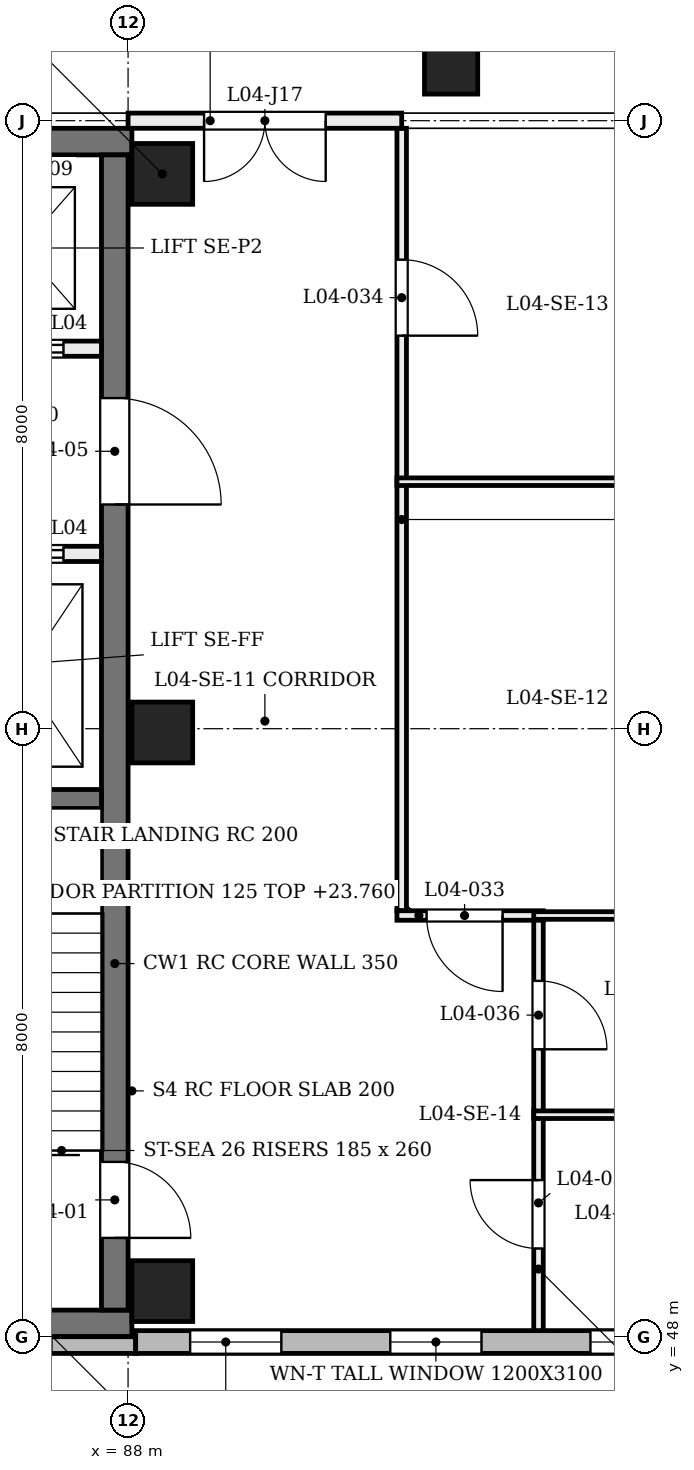
"""IFC4 building model, lengths in metres.
Left out: names, types, materials, properties, quantities, classifications, styles, units other than length and angle.
Written with IfcOpenShell. Run it as: python <this file> out.ifc"""

import sys

from ifc_helpers import new_model, si_unit, direction, frame, frame_2d, origin, origin_2d, place, context, subcontext, project, spatial, rectangle, extrude, element, fill, save


model = new_model("IFC4")
c1 = context("Model", 3, precision=1e-05, world=origin(), true_north=direction((0.0, 1.0)))
c2 = subcontext(c1, "Body", "Model", "MODEL_VIEW")
j1 = project(units=[si_unit("LENGTHUNIT", "METRE"), si_unit("PLANEANGLEUNIT", "RADIAN")], contexts=[c1])
p1 = place(None, origin())
s1 = spatial("IfcSite", under=j1, at=p1, CompositionType="ELEMENT")
p2 = place(p1, origin())
s2 = spatial("IfcBuilding", under=s1, at=p2, CompositionType="ELEMENT")
p3 = place(p2, frame((0.0, 0.0, 19.2)))
s3 = spatial("IfcBuildingStorey", under=s2, at=p3, CompositionType="ELEMENT", Elevation=19.2)
for number, where, z_axis, x_axis in (
    (1, (80.1, 48.175, 0.0), (0.0, 0.0, 1.0), (1.0, 0.0, 0.0)),
    (2, (80.1, 63.725, 0.0), (0.0, 0.0, 1.0), (1.0, 0.0, 0.0)),
):
    element("IfcWall", number, at=place(p3, frame(where, z_axis=z_axis, x_axis=x_axis)), inside=s3, PredefinedType="SHEAR", context=c2, shape_type="SweptSolid", body=[
        extrude(rectangle(XDim=7.95, YDim=0.35, at=frame_2d((3.975, 0.0))), origin(), (0.0, 0.0, 1.0), 4.58),
    ])
p4 = place(p3, frame((87.825, 48.35, 0.0), z_axis=(0.0, 0.0, 1.0), x_axis=(0.0, 1.0, 0.0)))
e3 = element("IfcWall", 3, at=p4, inside=s3, PredefinedType="SHEAR", context=c2, shape_type="SweptSolid", body=[
    extrude(rectangle(XDim=15.2, YDim=0.35, at=frame_2d((7.6, 0.0))), origin(), (0.0, 0.0, 1.0), 4.58),
])
p5 = place(p4, frame((0.95, 0.0, 0.0)))
e4 = element("IfcOpeningElement", 4, at=p5, cuts=e3, PredefinedType="OPENING", context=c2, shape_type="SweptSolid", body=[
    extrude(rectangle(XDim=1.0, YDim=2.1, at=frame_2d((0.5, 1.05))), frame((0.0, 0.185, 0.0), z_axis=(0.0, -1.0, 0.0), x_axis=(1.0, 0.0, 0.0)), (0.0, 0.0, 1.0), 0.37),
])
p6 = place(p4, frame((10.6, 0.0, 0.0)))
e5 = element("IfcOpeningElement", 5, at=p6, cuts=e3, PredefinedType="OPENING", context=c2, shape_type="SweptSolid", body=[
    extrude(rectangle(XDim=1.4, YDim=2.1, at=frame_2d((0.7, 1.05))), frame((0.0, 0.185, 0.0), z_axis=(0.0, -1.0, 0.0), x_axis=(1.0, 0.0, 0.0)), (0.0, 0.0, 1.0), 0.37),
])
for number, where, z_axis, x_axis in (
    (6, (88.45, 48.6, 0.0), (0.0, 0.0, 1.0), (1.0, 0.0, 0.0)),
    (7, (88.45, 55.95, 0.0), (0.0, 0.0, 1.0), (1.0, 0.0, 0.0)),
    (8, (88.45, 63.3, 0.0), (0.0, 0.0, 1.0), (1.0, 0.0, 0.0)),
):
    element("IfcColumn", number, at=place(p3, frame(where, z_axis=z_axis, x_axis=x_axis)), inside=s3, PredefinedType="COLUMN", context=c2, shape_type="SweptSolid", body=[
        extrude(rectangle(XDim=0.8, YDim=0.8, at=origin_2d()), origin(), (0.0, 0.0, 1.0), 4.8),
    ])
p7 = place(p3, frame((92.0, 64.7, 0.0), z_axis=(0.203937582782, 0.0, 0.978983892783), x_axis=(0.0, 1.0, 0.0)))
e9 = element("IfcColumn", 9, at=p7, inside=s3, PredefinedType="COLUMN", context=c2, shape_type="SweptSolid", body=[
    extrude(rectangle(XDim=0.7, YDim=0.7, at=origin_2d()), origin(), (0.0, 0.0, 1.0), 4.678),
])
p8 = place(p3, frame((79.9, 47.89, 0.0), z_axis=(0.0, 0.0, 1.0), x_axis=(1.0, 0.0, 0.0)))
e10 = element("IfcWall", 10, at=p8, inside=s3, PredefinedType="SOLIDWALL", context=c2, shape_type="SweptSolid", body=[
    extrude(rectangle(XDim=8.2, YDim=0.22, at=frame_2d((4.1, 0.0))), origin(), (0.0, 0.0, 1.0), 3.9),
])
p9 = place(p8, frame((1.308, 0.0, 0.9)))
e11 = element("IfcOpeningElement", 11, at=p9, cuts=e10, PredefinedType="OPENING", context=c2, shape_type="SweptSolid", body=[
    extrude(rectangle(XDim=0.45, YDim=2.6, at=frame_2d((0.225, 1.3))), frame((0.0, 0.12, 0.0), z_axis=(0.0, -1.0, 0.0), x_axis=(1.0, 0.0, 0.0)), (0.0, 0.0, 1.0), 0.24),
])
p10 = place(p8, frame((3.975, 0.0, 0.9)))
e12 = element("IfcOpeningElement", 12, at=p10, cuts=e10, PredefinedType="OPENING", context=c2, shape_type="SweptSolid", body=[
    extrude(rectangle(XDim=0.45, YDim=2.6, at=frame_2d((0.225, 1.3))), frame((0.0, 0.12, 0.0), z_axis=(0.0, -1.0, 0.0), x_axis=(1.0, 0.0, 0.0)), (0.0, 0.0, 1.0), 0.24),
])
p11 = place(p8, frame((6.642, 0.0, 0.9)))
e13 = element("IfcOpeningElement", 13, at=p11, cuts=e10, PredefinedType="OPENING", context=c2, shape_type="SweptSolid", body=[
    extrude(rectangle(XDim=0.45, YDim=2.6, at=frame_2d((0.225, 1.3))), frame((0.0, 0.12, 0.0), z_axis=(0.0, -1.0, 0.0), x_axis=(1.0, 0.0, 0.0)), (0.0, 0.0, 1.0), 0.24),
])
p12 = place(p3, frame((88.1, 47.93, 0.0), z_axis=(0.0, 0.0, 1.0), x_axis=(1.0, 0.0, 0.0)))
e14 = element("IfcWall", 14, at=p12, inside=s3, PredefinedType="SOLIDWALL", context=c2, shape_type="SweptSolid", body=[
    extrude(rectangle(XDim=7.9, YDim=0.3, at=frame_2d((3.95, 0.0))), origin(), (0.0, 0.0, 1.0), 3.9),
])
p13 = place(p12, frame((0.717, 0.0, 0.75)))
e15 = element("IfcOpeningElement", 15, at=p13, cuts=e14, PredefinedType="OPENING", context=c2, shape_type="SweptSolid", body=[
    extrude(rectangle(XDim=1.2, YDim=3.1, at=frame_2d((0.6, 1.55))), frame((0.0, 0.16, 0.0), z_axis=(0.0, -1.0, 0.0), x_axis=(1.0, 0.0, 0.0)), (0.0, 0.0, 1.0), 0.32),
])
p14 = place(p12, frame((3.35, 0.0, 0.75)))
e16 = element("IfcOpeningElement", 16, at=p14, cuts=e14, PredefinedType="OPENING", context=c2, shape_type="SweptSolid", body=[
    extrude(rectangle(XDim=1.2, YDim=3.1, at=frame_2d((0.6, 1.55))), frame((0.0, 0.16, 0.0), z_axis=(0.0, -1.0, 0.0), x_axis=(1.0, 0.0, 0.0)), (0.0, 0.0, 1.0), 0.32),
])
p15 = place(p12, frame((5.983, 0.0, 0.75)))
e17 = element("IfcOpeningElement", 17, at=p15, cuts=e14, PredefinedType="OPENING", context=c2, shape_type="SweptSolid", body=[
    extrude(rectangle(XDim=1.2, YDim=3.1, at=frame_2d((0.6, 1.55))), frame((0.0, 0.16, 0.0), z_axis=(0.0, -1.0, 0.0), x_axis=(1.0, 0.0, 0.0)), (0.0, 0.0, 1.0), 0.32),
])
p16 = place(p3, frame((87.65, 55.075, 0.0), z_axis=(0.0, 0.0, 1.0), x_axis=(-1.0, 0.0, 0.0)))
e18 = element("IfcWall", 18, at=p16, inside=s3, PredefinedType="SOLIDWALL", context=c2, shape_type="SweptSolid", body=[
    extrude(rectangle(XDim=3.1, YDim=0.25, at=frame_2d((1.55, 0.0))), origin(), (0.0, 0.0, 1.0), 4.55),
])
p17 = place(p3, frame((87.65, 58.3, 0.0), z_axis=(0.0, 0.0, 1.0), x_axis=(-1.0, 0.0, 0.0)))
e19 = element("IfcWall", 19, at=p17, inside=s3, PredefinedType="SOLIDWALL", context=c2, shape_type="SweptSolid", body=[
    extrude(rectangle(XDim=7.2, YDim=0.2, at=frame_2d((3.6, 0.0))), origin(), (0.0, 0.0, 1.0), 4.55),
])
p18 = place(p17, frame((0.5, 0.0, 0.0)))
e20 = element("IfcOpeningElement", 20, at=p18, cuts=e19, PredefinedType="OPENING", context=c2, shape_type="SweptSolid", body=[
    extrude(rectangle(XDim=1.1, YDim=2.1, at=frame_2d((0.55, 1.05))), frame((0.0, 0.11, 0.0), z_axis=(0.0, -1.0, 0.0), x_axis=(1.0, 0.0, 0.0)), (0.0, 0.0, 1.0), 0.22),
])
p19 = place(p17, frame((5.6, 0.0, 0.0)))
e21 = element("IfcOpeningElement", 21, at=p19, cuts=e19, PredefinedType="OPENING", context=c2, shape_type="SweptSolid", body=[
    extrude(rectangle(XDim=1.1, YDim=2.1, at=frame_2d((0.55, 1.05))), frame((0.0, 0.11, 0.0), z_axis=(0.0, -1.0, 0.0), x_axis=(1.0, 0.0, 0.0)), (0.0, 0.0, 1.0), 0.22),
])
p20 = place(p17, frame((3.1, 0.0, 0.0)))
e22 = element("IfcOpeningElement", 22, at=p20, cuts=e19, PredefinedType="OPENING", context=c2, shape_type="SweptSolid", body=[
    extrude(rectangle(XDim=1.0, YDim=2.1, at=frame_2d((0.5, 1.05))), frame((0.0, 0.11, 0.0), z_axis=(0.0, -1.0, 0.0), x_axis=(1.0, 0.0, 0.0)), (0.0, 0.0, 1.0), 0.22),
])
p21 = place(p3, frame((87.65, 61.0, 0.0), z_axis=(0.0, 0.0, 1.0), x_axis=(-1.0, 0.0, 0.0)))
e23 = element("IfcWall", 23, at=p21, inside=s3, PredefinedType="SOLIDWALL", context=c2, shape_type="SweptSolid", body=[
    extrude(rectangle(XDim=7.2, YDim=0.2, at=frame_2d((3.6, 0.0))), origin(), (0.0, 0.0, 1.0), 4.55),
])
p22 = place(p21, frame((0.5, 0.0, 0.0)))
e24 = element("IfcOpeningElement", 24, at=p22, cuts=e23, PredefinedType="OPENING", context=c2, shape_type="SweptSolid", body=[
    extrude(rectangle(XDim=1.1, YDim=2.1, at=frame_2d((0.55, 1.05))), frame((0.0, 0.11, 0.0), z_axis=(0.0, -1.0, 0.0), x_axis=(1.0, 0.0, 0.0)), (0.0, 0.0, 1.0), 0.22),
])
p23 = place(p21, frame((5.6, 0.0, 0.0)))
e25 = element("IfcOpeningElement", 25, at=p23, cuts=e23, PredefinedType="OPENING", context=c2, shape_type="SweptSolid", body=[
    extrude(rectangle(XDim=1.1, YDim=2.1, at=frame_2d((0.55, 1.05))), frame((0.0, 0.11, 0.0), z_axis=(0.0, -1.0, 0.0), x_axis=(1.0, 0.0, 0.0)), (0.0, 0.0, 1.0), 0.22),
])
p24 = place(p21, frame((3.1, 0.0, 0.0)))
e26 = element("IfcOpeningElement", 26, at=p24, cuts=e23, PredefinedType="OPENING", context=c2, shape_type="SweptSolid", body=[
    extrude(rectangle(XDim=1.0, YDim=2.1, at=frame_2d((0.5, 1.05))), frame((0.0, 0.11, 0.0), z_axis=(0.0, -1.0, 0.0), x_axis=(1.0, 0.0, 0.0)), (0.0, 0.0, 1.0), 0.22),
])
p25 = place(p3, frame((91.6, 53.605, 0.0), z_axis=(0.0, 0.0, 1.0), x_axis=(0.0, 1.0, 0.0)))
e27 = element("IfcWall", 27, at=p25, inside=s3, PredefinedType="PARTITIONING", context=c2, shape_type="SweptSolid", body=[
    extrude(rectangle(XDim=10.295, YDim=0.125, at=frame_2d((5.147, 0.0))), origin(), (0.0, 0.0, 1.0), 3.88),
])
p26 = place(p25, frame((7.567, 0.0, 0.0)))
e28 = element("IfcOpeningElement", 28, at=p26, cuts=e27, PredefinedType="OPENING", context=c2, shape_type="SweptSolid", body=[
    extrude(rectangle(XDim=1.0, YDim=2.1, at=frame_2d((0.5, 1.05))), frame((0.0, 0.073, 0.0), z_axis=(0.0, -1.0, 0.0), x_axis=(1.0, 0.0, 0.0)), (0.0, 0.0, 1.0), 0.145),
])
p27 = place(p3, frame((91.538, 53.542, 0.0), z_axis=(0.0, 0.0, 1.0), x_axis=(1.0, 0.0, 0.0)))
e29 = element("IfcWall", 29, at=p27, inside=s3, PredefinedType="PARTITIONING", context=c2, shape_type="SweptSolid", body=[
    extrude(rectangle(XDim=1.925, YDim=0.125, at=frame_2d((0.962, 0.0))), origin(), (0.0, 0.0, 1.0), 4.56),
])
p28 = place(p27, frame((0.39, 0.0, 0.0)))
e30 = element("IfcOpeningElement", 30, at=p28, cuts=e29, PredefinedType="OPENING", context=c2, shape_type="SweptSolid", body=[
    extrude(rectangle(XDim=1.0, YDim=2.1, at=frame_2d((0.5, 1.05))), frame((0.0, 0.073, 0.0), z_axis=(0.0, -1.0, 0.0), x_axis=(1.0, 0.0, 0.0)), (0.0, 0.0, 1.0), 0.145),
])
p29 = place(p3, frame((93.337, 53.542, 0.0), z_axis=(0.0, 0.0, 1.0), x_axis=(1.0, 0.0, 0.0)))
e31 = element("IfcWall", 31, at=p29, inside=s3, PredefinedType="PARTITIONING", context=c2, shape_type="SweptSolid", body=[
    extrude(rectangle(XDim=2.583, YDim=0.1, at=frame_2d((1.291, 0.0))), origin(), (0.0, 0.0, 1.0), 3.88),
])
p30 = place(p3, frame((91.538, 59.25, 0.0), z_axis=(0.0, 0.0, 1.0), x_axis=(1.0, 0.0, 0.0)))
e32 = element("IfcWall", 32, at=p30, inside=s3, PredefinedType="PARTITIONING", context=c2, shape_type="SweptSolid", body=[
    extrude(rectangle(XDim=4.162, YDim=0.1, at=frame_2d((2.081, 0.0))), origin(), (0.0, 0.0, 1.0), 3.98),
])
p31 = place(p3, frame((93.4, 48.08, 0.0), z_axis=(0.0, 0.0, 1.0), x_axis=(0.0, 1.0, 0.0)))
e33 = element("IfcWall", 33, at=p31, inside=s3, PredefinedType="PARTITIONING", context=c2, shape_type="SweptSolid", body=[
    extrude(rectangle(XDim=5.4, YDim=0.125, at=frame_2d((2.7, 0.0))), origin(), (0.0, 0.0, 1.0), 3.88),
])
p32 = place(p31, frame((1.081, 0.0, 0.0)))
e34 = element("IfcOpeningElement", 34, at=p32, cuts=e33, PredefinedType="OPENING", context=c2, shape_type="SweptSolid", body=[
    extrude(rectangle(XDim=0.9, YDim=2.1, at=frame_2d((0.45, 1.05))), frame((0.0, 0.073, 0.0), z_axis=(0.0, -1.0, 0.0), x_axis=(1.0, 0.0, 0.0)), (0.0, 0.0, 1.0), 0.145),
])
p33 = place(p31, frame((3.702, 0.0, 0.0)))
e35 = element("IfcOpeningElement", 35, at=p33, cuts=e33, PredefinedType="OPENING", context=c2, shape_type="SweptSolid", body=[
    extrude(rectangle(XDim=0.9, YDim=2.1, at=frame_2d((0.45, 1.05))), frame((0.0, 0.073, 0.0), z_axis=(0.0, -1.0, 0.0), x_axis=(1.0, 0.0, 0.0)), (0.0, 0.0, 1.0), 0.145),
])
p34 = place(p3, frame((93.337, 50.921, 0.0), z_axis=(0.0, 0.0, 1.0), x_axis=(1.0, 0.0, 0.0)))
e36 = element("IfcWall", 36, at=p34, inside=s3, PredefinedType="PARTITIONING", context=c2, shape_type="SweptSolid", body=[
    extrude(rectangle(XDim=2.583, YDim=0.1, at=frame_2d((1.291, 0.0))), origin(), (0.0, 0.0, 1.0), 3.88),
])
p35 = place(p3, frame((88.0, 64.0, 0.0), z_axis=(0.0, 0.0, 1.0), x_axis=(1.0, 0.0, 0.0)))
e37 = element("IfcWall", 37, at=p35, inside=s3, PredefinedType="PARTITIONING", context=c2, shape_type="SweptSolid", body=[
    extrude(rectangle(XDim=3.6, YDim=0.2, at=frame_2d((1.8, 0.0))), origin(), (0.0, 0.0, 1.0), 3.88),
])
p36 = place(p35, frame((1.0, 0.0, 0.0)))
e38 = element("IfcOpeningElement", 38, at=p36, cuts=e37, PredefinedType="OPENING", context=c2, shape_type="SweptSolid", body=[
    extrude(rectangle(XDim=1.6, YDim=2.1, at=frame_2d((0.8, 1.05))), frame((0.0, 0.11, 0.0), z_axis=(0.0, -1.0, 0.0), x_axis=(1.0, 0.0, 0.0)), (0.0, 0.0, 1.0), 0.22),
])
p37 = place(p13, origin())
e39 = element("IfcWindow", 39, at=p37, inside=s3, PartitioningType="SINGLE_PANEL", PredefinedType="WINDOW", context=c2, shape_type="SweptSolid", body=[
    extrude(rectangle(XDim=1.2, YDim=3.1, at=frame_2d((0.6, 1.55))), frame((0.0, 0.03, 0.0), z_axis=(0.0, -1.0, 0.0), x_axis=(1.0, 0.0, 0.0)), (0.0, 0.0, 1.0), 0.06),
])
fill(e15, e39)
p38 = place(p14, origin())
e40 = element("IfcWindow", 40, at=p38, inside=s3, PartitioningType="SINGLE_PANEL", PredefinedType="WINDOW", context=c2, shape_type="SweptSolid", body=[
    extrude(rectangle(XDim=1.2, YDim=3.1, at=frame_2d((0.6, 1.55))), frame((0.0, 0.03, 0.0), z_axis=(0.0, -1.0, 0.0), x_axis=(1.0, 0.0, 0.0)), (0.0, 0.0, 1.0), 0.06),
])
fill(e16, e40)
p39 = place(p15, origin())
e41 = element("IfcWindow", 41, at=p39, inside=s3, PartitioningType="SINGLE_PANEL", PredefinedType="WINDOW", context=c2, shape_type="SweptSolid", body=[
    extrude(rectangle(XDim=1.2, YDim=3.1, at=frame_2d((0.6, 1.55))), frame((0.0, 0.03, 0.0), z_axis=(0.0, -1.0, 0.0), x_axis=(1.0, 0.0, 0.0)), (0.0, 0.0, 1.0), 0.06),
])
fill(e17, e41)
p40 = place(p5, frame((1.0, 0.0, 0.0), z_axis=(0.0, 0.0, 1.0), x_axis=(-1.0, 0.0, 0.0)))
e42 = element("IfcDoor", 42, at=p40, inside=s3, OperationType="SINGLE_SWING_LEFT", PredefinedType="DOOR", context=c2, shape_type="SweptSolid", body=[
    extrude(rectangle(XDim=1.0, YDim=2.1, at=frame_2d((0.5, 1.05))), frame((0.0, 0.025, 0.0), z_axis=(0.0, -1.0, 0.0), x_axis=(1.0, 0.0, 0.0)), (0.0, 0.0, 1.0), 0.05),
])
fill(e4, e42)
p41 = place(p18, frame((1.1, 0.0, 0.0), z_axis=(0.0, 0.0, 1.0), x_axis=(-1.0, 0.0, 0.0)))
e43 = element("IfcDoor", 43, at=p41, inside=s3, OperationType="DOUBLE_DOOR_SLIDING", PredefinedType="DOOR", context=c2, shape_type="SweptSolid", body=[
    extrude(rectangle(XDim=1.1, YDim=2.1, at=frame_2d((0.55, 1.05))), frame((0.0, 0.025, 0.0), z_axis=(0.0, -1.0, 0.0), x_axis=(1.0, 0.0, 0.0)), (0.0, 0.0, 1.0), 0.05),
])
fill(e20, e43)
p42 = place(p22, origin())
e44 = element("IfcDoor", 44, at=p42, inside=s3, OperationType="DOUBLE_DOOR_SLIDING", PredefinedType="DOOR", context=c2, shape_type="SweptSolid", body=[
    extrude(rectangle(XDim=1.1, YDim=2.1, at=frame_2d((0.55, 1.05))), frame((0.0, 0.025, 0.0), z_axis=(0.0, -1.0, 0.0), x_axis=(1.0, 0.0, 0.0)), (0.0, 0.0, 1.0), 0.05),
])
fill(e24, e44)
p43 = place(p6, frame((1.4, 0.0, 0.0), z_axis=(0.0, 0.0, 1.0), x_axis=(-1.0, 0.0, 0.0)))
e45 = element("IfcDoor", 45, at=p43, inside=s3, OperationType="SINGLE_SWING_LEFT", PredefinedType="DOOR", context=c2, shape_type="SweptSolid", body=[
    extrude(rectangle(XDim=1.4, YDim=2.1, at=frame_2d((0.7, 1.05))), frame((0.0, 0.025, 0.0), z_axis=(0.0, -1.0, 0.0), x_axis=(1.0, 0.0, 0.0)), (0.0, 0.0, 1.0), 0.05),
])
fill(e5, e45)
p44 = place(p28, origin())
e46 = element("IfcDoor", 46, at=p44, inside=s3, OperationType="SINGLE_SWING_RIGHT", PredefinedType="DOOR", context=c2, shape_type="SweptSolid", body=[
    extrude(rectangle(XDim=1.0, YDim=2.1, at=frame_2d((0.5, 1.05))), frame((0.0, 0.025, 0.0), z_axis=(0.0, -1.0, 0.0), x_axis=(1.0, 0.0, 0.0)), (0.0, 0.0, 1.0), 0.05),
])
fill(e30, e46)
p45 = place(p26, frame((1.0, 0.0, 0.0), z_axis=(0.0, 0.0, 1.0), x_axis=(-1.0, 0.0, 0.0)))
e47 = element("IfcDoor", 47, at=p45, inside=s3, OperationType="SINGLE_SWING_LEFT", PredefinedType="DOOR", context=c2, shape_type="SweptSolid", body=[
    extrude(rectangle(XDim=1.0, YDim=2.1, at=frame_2d((0.5, 1.05))), frame((0.0, 0.025, 0.0), z_axis=(0.0, -1.0, 0.0), x_axis=(1.0, 0.0, 0.0)), (0.0, 0.0, 1.0), 0.05),
])
fill(e28, e47)
p46 = place(p32, frame((0.9, 0.0, 0.0), z_axis=(0.0, 0.0, 1.0), x_axis=(-1.0, 0.0, 0.0)))
e48 = element("IfcDoor", 48, at=p46, inside=s3, OperationType="SINGLE_SWING_RIGHT", PredefinedType="DOOR", context=c2, shape_type="SweptSolid", body=[
    extrude(rectangle(XDim=0.9, YDim=2.1, at=frame_2d((0.45, 1.05))), frame((0.0, 0.025, 0.0), z_axis=(0.0, -1.0, 0.0), x_axis=(1.0, 0.0, 0.0)), (0.0, 0.0, 1.0), 0.05),
])
fill(e34, e48)
p47 = place(p33, frame((0.9, 0.0, 0.0), z_axis=(0.0, 0.0, 1.0), x_axis=(-1.0, 0.0, 0.0)))
e49 = element("IfcDoor", 49, at=p47, inside=s3, OperationType="SINGLE_SWING_LEFT", PredefinedType="DOOR", context=c2, shape_type="SweptSolid", body=[
    extrude(rectangle(XDim=0.9, YDim=2.1, at=frame_2d((0.45, 1.05))), frame((0.0, 0.025, 0.0), z_axis=(0.0, -1.0, 0.0), x_axis=(1.0, 0.0, 0.0)), (0.0, 0.0, 1.0), 0.05),
])
fill(e35, e49)
p48 = place(p36, frame((1.6, 0.0, 0.0), z_axis=(0.0, 0.0, 1.0), x_axis=(-1.0, 0.0, 0.0)))
e50 = element("IfcDoor", 50, at=p48, inside=s3, OperationType="DOUBLE_DOOR_SINGLE_SWING", PredefinedType="DOOR", context=c2, shape_type="SweptSolid", body=[
    extrude(rectangle(XDim=1.6, YDim=2.1, at=frame_2d((0.8, 1.05))), frame((0.0, 0.025, 0.0), z_axis=(0.0, -1.0, 0.0), x_axis=(1.0, 0.0, 0.0)), (0.0, 0.0, 1.0), 0.05),
])
fill(e38, e50)
save(model, sys.argv[1])
